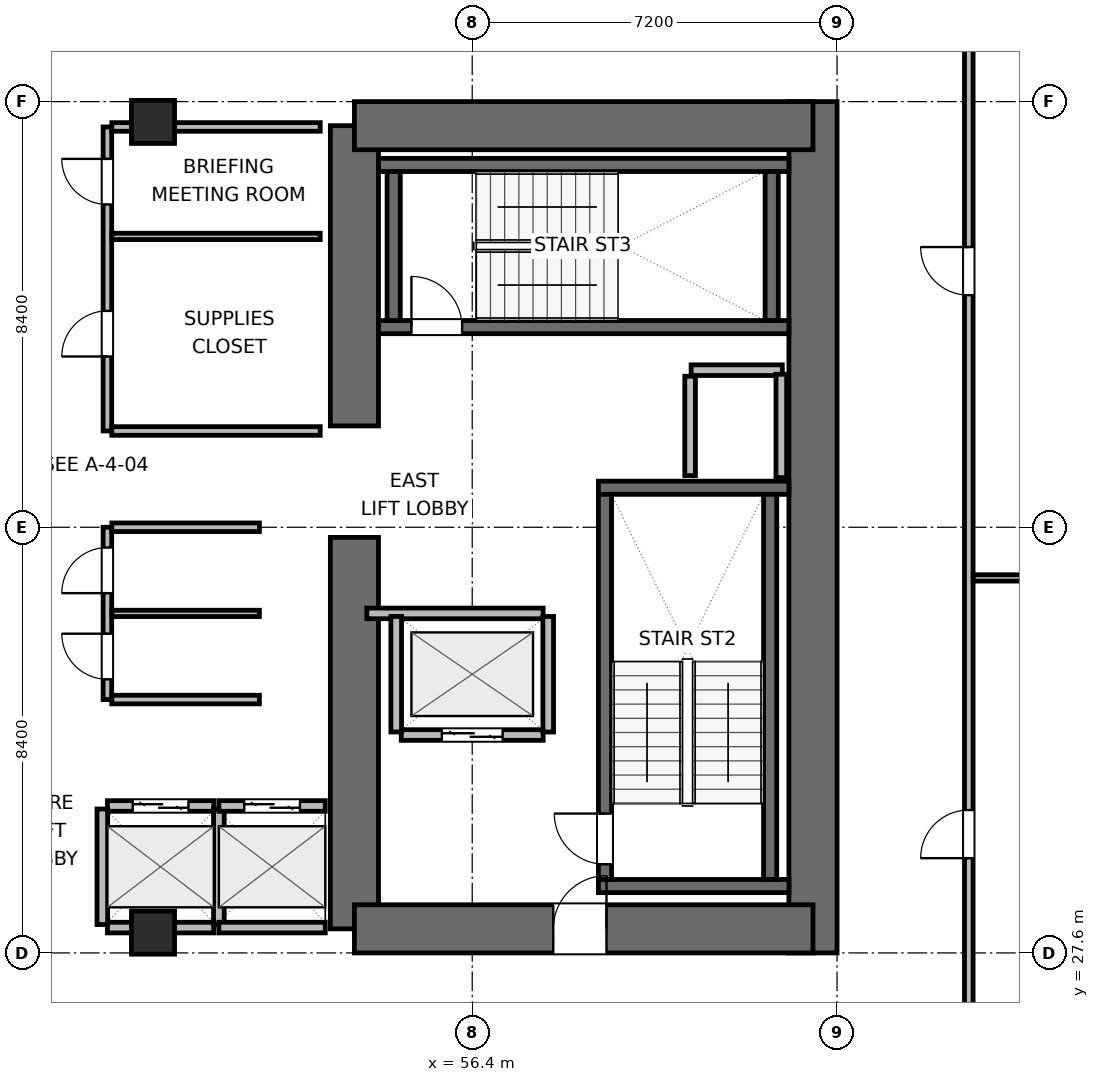
"""IFC4 building model, lengths in metres.
Left out: names, types, materials, properties, quantities, classifications, styles, units other than length and angle.
Written with IfcOpenShell. Run it as: python <this file> out.ifc"""

import sys

from ifc_helpers import new_model, si_unit, direction, frame, frame_2d, origin, origin_2d, place, context, subcontext, project, spatial, rectangle, extrude, element, fill, save


model = new_model("IFC4")
c1 = context("Model", 3, precision=1e-05, world=origin(), true_north=direction((0.0, 1.0)))
c2 = subcontext(c1, "Body", "Model", "MODEL_VIEW")
j1 = project(units=[si_unit("LENGTHUNIT", "METRE"), si_unit("PLANEANGLEUNIT", "RADIAN")], contexts=[c1])
p1 = place(None, origin())
s1 = spatial("IfcSite", under=j1, at=p1, CompositionType="ELEMENT")
p2 = place(p1, origin())
s2 = spatial("IfcBuilding", under=s1, at=p2, CompositionType="ELEMENT")
p3 = place(p2, frame((0.0, 0.0, 45.0)))
s3 = spatial("IfcBuildingStorey", under=s2, at=p3, CompositionType="ELEMENT", Elevation=45.0)
p4 = place(p3, frame((54.075, 28.075, 0.0), z_axis=(0.0, 0.0, 1.0), x_axis=(0.0, 1.0, 0.0)))
e1 = element("IfcWall", 1, at=p4, inside=s3, PredefinedType="SHEAR", context=c2, shape_type="SweptSolid", body=[
    extrude(rectangle(XDim=7.725, YDim=0.95, at=frame_2d((3.863, 0.0))), origin(), (0.0, 0.0, 1.0), 3.9),
])
p5 = place(p3, frame((54.075, 38.0, 0.0), z_axis=(0.0, 0.0, 1.0), x_axis=(0.0, 1.0, 0.0)))
e2 = element("IfcWall", 2, at=p5, inside=s3, PredefinedType="SHEAR", context=c2, shape_type="SweptSolid", body=[
    extrude(rectangle(XDim=5.925, YDim=0.95, at=frame_2d((2.962, 0.0))), origin(), (0.0, 0.0, 1.0), 3.9),
])
p6 = place(p3, frame((63.125, 27.6, 0.0), z_axis=(0.0, 0.0, 1.0), x_axis=(0.0, 1.0, 0.0)))
e3 = element("IfcWall", 3, at=p6, inside=s3, PredefinedType="SHEAR", context=c2, shape_type="SweptSolid", body=[
    extrude(rectangle(XDim=16.8, YDim=0.95, at=frame_2d((8.4, 0.0))), origin(), (0.0, 0.0, 1.0), 3.9),
])
p7 = place(p3, frame((54.075, 28.075, 0.0), z_axis=(0.0, 0.0, 1.0), x_axis=(1.0, 0.0, 0.0)))
e4 = element("IfcWall", 4, at=p7, inside=s3, PredefinedType="SHEAR", context=c2, shape_type="SweptSolid", body=[
    extrude(rectangle(XDim=9.05, YDim=0.95, at=frame_2d((4.525, 0.0))), origin(), (0.0, 0.0, 1.0), 3.9),
])
p8 = place(p7, frame((3.925, 0.0, 0.0)))
e5 = element("IfcOpeningElement", 5, at=p8, cuts=e4, PredefinedType="OPENING", context=c2, shape_type="SweptSolid", body=[
    extrude(rectangle(XDim=1.05, YDim=2.04, at=frame_2d((0.525, 1.02))), frame((0.0, 0.485, 0.0), z_axis=(0.0, -1.0, 0.0), x_axis=(1.0, 0.0, 0.0)), (0.0, 0.0, 1.0), 0.97),
])
p9 = place(p3, frame((54.075, 43.925, 0.0), z_axis=(0.0, 0.0, 1.0), x_axis=(1.0, 0.0, 0.0)))
e6 = element("IfcWall", 6, at=p9, inside=s3, PredefinedType="SHEAR", context=c2, shape_type="SweptSolid", body=[
    extrude(rectangle(XDim=9.05, YDim=0.95, at=frame_2d((4.525, 0.0))), origin(), (0.0, 0.0, 1.0), 3.9),
])
for number, where, z_axis, x_axis in (
    (7, (58.89, 28.92, 0.0), (0.0, 0.0, 1.0), (1.0, 0.0, 0.0)),
    (8, (58.89, 36.78, 0.0), (0.0, 0.0, 1.0), (1.0, 0.0, 0.0)),
):
    element("IfcWall", number, at=place(p3, frame(where, z_axis=z_axis, x_axis=x_axis)), inside=s3, PredefinedType="SHEAR", context=c2, shape_type="SweptSolid", body=[
        extrude(rectangle(XDim=3.76, YDim=0.26, at=frame_2d((1.88, 0.0))), origin(), (0.0, 0.0, 1.0), 3.9),
    ])
p10 = place(p3, frame((59.02, 29.05, 0.0), z_axis=(0.0, 0.0, 1.0), x_axis=(0.0, 1.0, 0.0)))
e9 = element("IfcWall", 9, at=p10, inside=s3, PredefinedType="SHEAR", context=c2, shape_type="SweptSolid", body=[
    extrude(rectangle(XDim=7.6, YDim=0.26, at=frame_2d((3.8, 0.0))), origin(), (0.0, 0.0, 1.0), 3.9),
])
p11 = place(p10, frame((0.3, 0.0, 0.0)))
e10 = element("IfcOpeningElement", 10, at=p11, cuts=e9, PredefinedType="OPENING", context=c2, shape_type="SweptSolid", body=[
    extrude(rectangle(XDim=1.0, YDim=2.04, at=frame_2d((0.5, 1.02))), frame((0.0, 0.14, 0.0), z_axis=(0.0, -1.0, 0.0), x_axis=(1.0, 0.0, 0.0)), (0.0, 0.0, 1.0), 0.28),
])
p12 = place(p3, frame((62.28, 29.05, 0.0), z_axis=(0.0, 0.0, 1.0), x_axis=(0.0, 1.0, 0.0)))
e11 = element("IfcWall", 11, at=p12, inside=s3, PredefinedType="SHEAR", context=c2, shape_type="SweptSolid", body=[
    extrude(rectangle(XDim=7.6, YDim=0.26, at=frame_2d((3.8, 0.0))), origin(), (0.0, 0.0, 1.0), 3.9),
])
p13 = place(p3, frame((54.55, 39.95, 0.0), z_axis=(0.0, 0.0, 1.0), x_axis=(1.0, 0.0, 0.0)))
e12 = element("IfcWall", 12, at=p13, inside=s3, PredefinedType="SHEAR", context=c2, shape_type="SweptSolid", body=[
    extrude(rectangle(XDim=8.1, YDim=0.26, at=frame_2d((4.05, 0.0))), origin(), (0.0, 0.0, 1.0), 3.9),
])
p14 = place(p13, frame((0.65, 0.0, 0.0)))
e13 = element("IfcOpeningElement", 13, at=p14, cuts=e12, PredefinedType="OPENING", context=c2, shape_type="SweptSolid", body=[
    extrude(rectangle(XDim=1.0, YDim=2.04, at=frame_2d((0.5, 1.02))), frame((0.0, 0.14, 0.0), z_axis=(0.0, -1.0, 0.0), x_axis=(1.0, 0.0, 0.0)), (0.0, 0.0, 1.0), 0.28),
])
p15 = place(p3, frame((54.55, 43.15, 0.0), z_axis=(0.0, 0.0, 1.0), x_axis=(1.0, 0.0, 0.0)))
e14 = element("IfcWall", 14, at=p15, inside=s3, PredefinedType="SHEAR", context=c2, shape_type="SweptSolid", body=[
    extrude(rectangle(XDim=8.1, YDim=0.26, at=frame_2d((4.05, 0.0))), origin(), (0.0, 0.0, 1.0), 3.9),
])
for number, where, z_axis, x_axis in (
    (15, (54.85, 40.08, 0.0), (0.0, 0.0, 1.0), (0.0, 1.0, 0.0)),
    (16, (62.31, 40.08, 0.0), (0.0, 0.0, 1.0), (0.0, 1.0, 0.0)),
):
    element("IfcWall", number, at=place(p3, frame(where, z_axis=z_axis, x_axis=x_axis)), inside=s3, PredefinedType="SHEAR", context=c2, shape_type="SweptSolid", body=[
        extrude(rectangle(XDim=2.94, YDim=0.26, at=frame_2d((1.47, 0.0))), origin(), (0.0, 0.0, 1.0), 3.9),
    ])
for number, where, z_axis, x_axis in (
    (17, (50.1, 28.0, 0.0), (0.0, 0.0, 1.0), (1.0, 0.0, 0.0)),
    (18, (50.1, 44.0, 0.0), (0.0, 0.0, 1.0), (1.0, 0.0, 0.0)),
):
    element("IfcColumn", number, at=place(p3, frame(where, z_axis=z_axis, x_axis=x_axis)), inside=s3, PredefinedType="COLUMN", context=c2, shape_type="SweptSolid", body=[
        extrude(rectangle(XDim=0.85, YDim=0.85, at=origin_2d()), origin(), (0.0, 0.0, 1.0), 3.9),
    ])
p16 = place(p3, frame((60.72, 39.1, 0.0), z_axis=(0.0, 0.0, 1.0), x_axis=(1.0, 0.0, 0.0)))
e19 = element("IfcWall", 19, at=p16, inside=s3, PredefinedType="PARTITIONING", context=c2, shape_type="SweptSolid", body=[
    extrude(rectangle(XDim=1.8, YDim=0.21, at=frame_2d((0.9, 0.0))), origin(), (0.0, 0.0, 1.0), 3.64),
])
p17 = place(p3, frame((60.7, 37.02, 0.0), z_axis=(0.0, 0.0, 1.0), x_axis=(0.0, 1.0, 0.0)))
e20 = element("IfcWall", 20, at=p17, inside=s3, PredefinedType="PARTITIONING", context=c2, shape_type="SweptSolid", body=[
    extrude(rectangle(XDim=1.96, YDim=0.21, at=frame_2d((0.98, 0.0))), origin(), (0.0, 0.0, 1.0), 3.64),
])
p18 = place(p3, frame((62.5, 36.98, 0.0), z_axis=(0.0, 0.0, 1.0), x_axis=(0.0, 1.0, 0.0)))
e21 = element("IfcWall", 21, at=p18, inside=s3, PredefinedType="PARTITIONING", context=c2, shape_type="SweptSolid", body=[
    extrude(rectangle(XDim=2.04, YDim=0.21, at=frame_2d((1.02, 0.0))), origin(), (0.0, 0.0, 1.0), 3.64),
])
p19 = place(p3, frame((55.0, 31.9, 0.0), z_axis=(0.0, 0.0, 1.0), x_axis=(1.0, 0.0, 0.0)))
e22 = element("IfcWall", 22, at=p19, inside=s3, PredefinedType="PARTITIONING", context=c2, shape_type="SweptSolid", body=[
    extrude(rectangle(XDim=2.8, YDim=0.21, at=frame_2d((1.4, 0.0))), origin(), (0.0, 0.0, 1.0), 3.64),
])
p20 = place(p19, frame((0.8, 0.0, 0.0)))
e23 = element("IfcOpeningElement", 23, at=p20, cuts=e22, PredefinedType="OPENING", context=c2, shape_type="SweptSolid", body=[
    extrude(rectangle(XDim=1.2, YDim=2.04, at=frame_2d((0.6, 1.02))), frame((0.0, 0.115, 0.0), z_axis=(0.0, -1.0, 0.0), x_axis=(1.0, 0.0, 0.0)), (0.0, 0.0, 1.0), 0.23),
])
p21 = place(p3, frame((54.32, 34.3, 0.0), z_axis=(0.0, 0.0, 1.0), x_axis=(1.0, 0.0, 0.0)))
e24 = element("IfcWall", 24, at=p21, inside=s3, PredefinedType="PARTITIONING", context=c2, shape_type="SweptSolid", body=[
    extrude(rectangle(XDim=3.48, YDim=0.21, at=frame_2d((1.74, 0.0))), origin(), (0.0, 0.0, 1.0), 3.64),
])
for number, where, z_axis, x_axis in (
    (25, (54.9, 31.96, 0.0), (0.0, 0.0, 1.0), (0.0, 1.0, 0.0)),
    (26, (57.9, 31.96, 0.0), (0.0, 0.0, 1.0), (0.0, 1.0, 0.0)),
):
    element("IfcWall", number, at=place(p3, frame(where, z_axis=z_axis, x_axis=x_axis)), inside=s3, PredefinedType="PARTITIONING", context=c2, shape_type="SweptSolid", body=[
        extrude(rectangle(XDim=2.28, YDim=0.21, at=frame_2d((1.14, 0.0))), origin(), (0.0, 0.0, 1.0), 3.64),
    ])
p22 = place(p3, frame((49.2, 30.5, 0.0), z_axis=(0.0, 0.0, 1.0), x_axis=(1.0, 0.0, 0.0)))
e27 = element("IfcWall", 27, at=p22, inside=s3, PredefinedType="PARTITIONING", context=c2, shape_type="SweptSolid", body=[
    extrude(rectangle(XDim=2.1, YDim=0.21, at=frame_2d((1.05, 0.0))), origin(), (0.0, 0.0, 1.0), 3.64),
])
p23 = place(p22, frame((0.5, 0.0, 0.0)))
e28 = element("IfcOpeningElement", 28, at=p23, cuts=e27, PredefinedType="OPENING", context=c2, shape_type="SweptSolid", body=[
    extrude(rectangle(XDim=1.1, YDim=2.04, at=frame_2d((0.55, 1.02))), frame((0.0, 0.115, 0.0), z_axis=(0.0, -1.0, 0.0), x_axis=(1.0, 0.0, 0.0)), (0.0, 0.0, 1.0), 0.23),
])
p24 = place(p3, frame((49.2, 28.1, 0.0), z_axis=(0.0, 0.0, 1.0), x_axis=(1.0, 0.0, 0.0)))
e29 = element("IfcWall", 29, at=p24, inside=s3, PredefinedType="PARTITIONING", context=c2, shape_type="SweptSolid", body=[
    extrude(rectangle(XDim=2.1, YDim=0.21, at=frame_2d((1.05, 0.0))), origin(), (0.0, 0.0, 1.0), 2.525),
])
for number, where, z_axis, x_axis in (
    (30, (49.1, 28.16, 0.0), (0.0, 0.0, 1.0), (0.0, 1.0, 0.0)),
    (31, (51.4, 28.16, 0.0), (0.0, 0.0, 1.0), (0.0, 1.0, 0.0)),
):
    element("IfcWall", number, at=place(p3, frame(where, z_axis=z_axis, x_axis=x_axis)), inside=s3, PredefinedType="PARTITIONING", context=c2, shape_type="SweptSolid", body=[
        extrude(rectangle(XDim=2.28, YDim=0.21, at=frame_2d((1.14, 0.0))), origin(), (0.0, 0.0, 1.0), 3.64),
    ])
p25 = place(p3, frame((51.4, 30.5, 0.0), z_axis=(0.0, 0.0, 1.0), x_axis=(1.0, 0.0, 0.0)))
e32 = element("IfcWall", 32, at=p25, inside=s3, PredefinedType="PARTITIONING", context=c2, shape_type="SweptSolid", body=[
    extrude(rectangle(XDim=2.1, YDim=0.21, at=frame_2d((1.05, 0.0))), origin(), (0.0, 0.0, 1.0), 3.64),
])
p26 = place(p25, frame((0.5, 0.0, 0.0)))
e33 = element("IfcOpeningElement", 33, at=p26, cuts=e32, PredefinedType="OPENING", context=c2, shape_type="SweptSolid", body=[
    extrude(rectangle(XDim=1.1, YDim=2.04, at=frame_2d((0.55, 1.02))), frame((0.0, 0.115, 0.0), z_axis=(0.0, -1.0, 0.0), x_axis=(1.0, 0.0, 0.0)), (0.0, 0.0, 1.0), 0.23),
])
p27 = place(p3, frame((51.4, 28.1, 0.0), z_axis=(0.0, 0.0, 1.0), x_axis=(1.0, 0.0, 0.0)))
e34 = element("IfcWall", 34, at=p27, inside=s3, PredefinedType="PARTITIONING", context=c2, shape_type="SweptSolid", body=[
    extrude(rectangle(XDim=2.1, YDim=0.21, at=frame_2d((1.05, 0.0))), origin(), (0.0, 0.0, 1.0), 2.525),
])
p28 = place(p3, frame((49.2, 32.6, 0.0), z_axis=(0.0, 0.0, 1.0), x_axis=(0.0, 1.0, 0.0)))
e35 = element("IfcWall", 35, at=p28, inside=s3, PredefinedType="PARTITIONING", context=c2, shape_type="SweptSolid", body=[
    extrude(rectangle(XDim=3.4, YDim=0.17, at=frame_2d((1.7, 0.0))), origin(), (0.0, 0.0, 1.0), 3.64),
])
p29 = place(p28, frame((0.4, 0.0, 0.0)))
e36 = element("IfcOpeningElement", 36, at=p29, cuts=e35, PredefinedType="OPENING", context=c2, shape_type="SweptSolid", body=[
    extrude(rectangle(XDim=0.9, YDim=2.02, at=frame_2d((0.45, 1.01))), frame((0.0, 0.095, 0.0), z_axis=(0.0, -1.0, 0.0), x_axis=(1.0, 0.0, 0.0)), (0.0, 0.0, 1.0), 0.19),
])
p30 = place(p28, frame((2.1, 0.0, 0.0)))
e37 = element("IfcOpeningElement", 37, at=p30, cuts=e35, PredefinedType="OPENING", context=c2, shape_type="SweptSolid", body=[
    extrude(rectangle(XDim=0.9, YDim=2.02, at=frame_2d((0.45, 1.01))), frame((0.0, 0.095, 0.0), z_axis=(0.0, -1.0, 0.0), x_axis=(1.0, 0.0, 0.0)), (0.0, 0.0, 1.0), 0.19),
])
for number, where, z_axis, x_axis in (
    (38, (49.287, 32.6, 0.0), (0.0, 0.0, 1.0), (1.0, 0.0, 0.0)),
    (39, (49.287, 36.0, 0.0), (0.0, 0.0, 1.0), (1.0, 0.0, 0.0)),
):
    element("IfcWall", number, at=place(p3, frame(where, z_axis=z_axis, x_axis=x_axis)), inside=s3, PredefinedType="PARTITIONING", context=c2, shape_type="SweptSolid", body=[
        extrude(rectangle(XDim=2.913, YDim=0.17, at=frame_2d((1.457, 0.0))), origin(), (0.0, 0.0, 1.0), 3.64),
    ])
p31 = place(p3, frame((49.287, 34.3, 0.0), z_axis=(0.0, 0.0, 1.0), x_axis=(1.0, 0.0, 0.0)))
e40 = element("IfcWall", 40, at=p31, inside=s3, PredefinedType="PARTITIONING", context=c2, shape_type="SweptSolid", body=[
    extrude(rectangle(XDim=2.913, YDim=0.125, at=frame_2d((1.457, 0.0))), origin(), (0.0, 0.0, 1.0), 3.64),
])
p32 = place(p3, frame((49.2, 37.9, 0.0), z_axis=(0.0, 0.0, 1.0), x_axis=(0.0, 1.0, 0.0)))
e41 = element("IfcWall", 41, at=p32, inside=s3, PredefinedType="PARTITIONING", context=c2, shape_type="SweptSolid", body=[
    extrude(rectangle(XDim=6.0, YDim=0.17, at=frame_2d((3.0, 0.0))), origin(), (0.0, 0.0, 1.0), 3.64),
])
p33 = place(p32, frame((1.47, 0.0, 0.0)))
e42 = element("IfcOpeningElement", 42, at=p33, cuts=e41, PredefinedType="OPENING", context=c2, shape_type="SweptSolid", body=[
    extrude(rectangle(XDim=0.9, YDim=2.02, at=frame_2d((0.45, 1.01))), frame((0.0, 0.095, 0.0), z_axis=(0.0, -1.0, 0.0), x_axis=(1.0, 0.0, 0.0)), (0.0, 0.0, 1.0), 0.19),
])
p34 = place(p32, frame((4.47, 0.0, 0.0)))
e43 = element("IfcOpeningElement", 43, at=p34, cuts=e41, PredefinedType="OPENING", context=c2, shape_type="SweptSolid", body=[
    extrude(rectangle(XDim=0.9, YDim=2.02, at=frame_2d((0.45, 1.01))), frame((0.0, 0.095, 0.0), z_axis=(0.0, -1.0, 0.0), x_axis=(1.0, 0.0, 0.0)), (0.0, 0.0, 1.0), 0.19),
])
p35 = place(p3, frame((49.287, 37.9, 0.0), z_axis=(0.0, 0.0, 1.0), x_axis=(1.0, 0.0, 0.0)))
e44 = element("IfcWall", 44, at=p35, inside=s3, PredefinedType="PARTITIONING", context=c2, shape_type="SweptSolid", body=[
    extrude(rectangle(XDim=4.113, YDim=0.17, at=frame_2d((2.056, 0.0))), origin(), (0.0, 0.0, 1.0), 3.64),
])
p36 = place(p3, frame((49.287, 43.9, 0.0), z_axis=(0.0, 0.0, 1.0), x_axis=(1.0, 0.0, 0.0)))
e45 = element("IfcWall", 45, at=p36, inside=s3, PredefinedType="PARTITIONING", context=c2, shape_type="SweptSolid", body=[
    extrude(rectangle(XDim=4.113, YDim=0.17, at=frame_2d((2.056, 0.0))), origin(), (0.0, 0.0, 1.0), 2.525),
])
p37 = place(p3, frame((49.287, 41.74, 0.0), z_axis=(0.0, 0.0, 1.0), x_axis=(1.0, 0.0, 0.0)))
e46 = element("IfcWall", 46, at=p37, inside=s3, PredefinedType="PARTITIONING", context=c2, shape_type="SweptSolid", body=[
    extrude(rectangle(XDim=4.113, YDim=0.125, at=frame_2d((2.056, 0.0))), origin(), (0.0, 0.0, 1.0), 3.64),
])
p38 = place(p3, frame((66.2, 24.977, 0.0), z_axis=(0.0, 0.0, 1.0), x_axis=(0.0, 1.0, 0.0)))
e47 = element("IfcWall", 47, at=p38, inside=s3, PredefinedType="PARTITIONING", context=c2, shape_type="SweptSolid", body=[
    extrude(rectangle(XDim=22.046, YDim=0.17, at=frame_2d((11.023, 0.0))), origin(), (0.0, 0.0, 1.0), 3.64),
])
p39 = place(p38, frame((4.493, 0.0, 0.0)))
e48 = element("IfcOpeningElement", 48, at=p39, cuts=e47, PredefinedType="OPENING", context=c2, shape_type="SweptSolid", body=[
    extrude(rectangle(XDim=0.95, YDim=2.04, at=frame_2d((0.475, 1.02))), frame((0.0, 0.095, 0.0), z_axis=(0.0, -1.0, 0.0), x_axis=(1.0, 0.0, 0.0)), (0.0, 0.0, 1.0), 0.19),
])
p40 = place(p38, frame((15.603, 0.0, 0.0)))
e49 = element("IfcOpeningElement", 49, at=p40, cuts=e47, PredefinedType="OPENING", context=c2, shape_type="SweptSolid", body=[
    extrude(rectangle(XDim=0.95, YDim=2.04, at=frame_2d((0.475, 1.02))), frame((0.0, 0.095, 0.0), z_axis=(0.0, -1.0, 0.0), x_axis=(1.0, 0.0, 0.0)), (0.0, 0.0, 1.0), 0.19),
])
p41 = place(p3, frame((66.287, 35.0, 0.0), z_axis=(0.0, 0.0, 1.0), x_axis=(1.0, 0.0, 0.0)))
e50 = element("IfcWall", 50, at=p41, inside=s3, PredefinedType="PARTITIONING", context=c2, shape_type="SweptSolid", body=[
    extrude(rectangle(XDim=12.668, YDim=0.125, at=frame_2d((6.334, 0.0))), origin(), (0.0, 0.0, 1.0), 3.64),
])
p42 = place(p11, origin())
e51 = element("IfcDoor", 51, at=p42, inside=s3, OperationType="SINGLE_SWING_RIGHT", PredefinedType="DOOR", context=c2, shape_type="SweptSolid", body=[
    extrude(rectangle(XDim=1.0, YDim=2.04, at=frame_2d((0.5, 1.02))), frame((0.0, 0.025, 0.0), z_axis=(0.0, -1.0, 0.0), x_axis=(1.0, 0.0, 0.0)), (0.0, 0.0, 1.0), 0.05),
])
fill(e10, e51)
p43 = place(p14, origin())
e52 = element("IfcDoor", 52, at=p43, inside=s3, OperationType="SINGLE_SWING_LEFT", PredefinedType="DOOR", context=c2, shape_type="SweptSolid", body=[
    extrude(rectangle(XDim=1.0, YDim=2.04, at=frame_2d((0.5, 1.02))), frame((0.0, 0.025, 0.0), z_axis=(0.0, -1.0, 0.0), x_axis=(1.0, 0.0, 0.0)), (0.0, 0.0, 1.0), 0.05),
])
fill(e13, e52)
p44 = place(p20, origin())
e53 = element("IfcDoor", 53, at=p44, inside=s3, OperationType="DOUBLE_DOOR_SLIDING", PredefinedType="DOOR", context=c2, shape_type="SweptSolid", body=[
    extrude(rectangle(XDim=1.2, YDim=2.04, at=frame_2d((0.6, 1.02))), frame((0.0, 0.025, 0.0), z_axis=(0.0, -1.0, 0.0), x_axis=(1.0, 0.0, 0.0)), (0.0, 0.0, 1.0), 0.05),
])
fill(e23, e53)
p45 = place(p23, origin())
e54 = element("IfcDoor", 54, at=p45, inside=s3, OperationType="DOUBLE_DOOR_SLIDING", PredefinedType="DOOR", context=c2, shape_type="SweptSolid", body=[
    extrude(rectangle(XDim=1.1, YDim=2.04, at=frame_2d((0.55, 1.02))), frame((0.0, 0.025, 0.0), z_axis=(0.0, -1.0, 0.0), x_axis=(1.0, 0.0, 0.0)), (0.0, 0.0, 1.0), 0.05),
])
fill(e28, e54)
p46 = place(p26, origin())
e55 = element("IfcDoor", 55, at=p46, inside=s3, OperationType="DOUBLE_DOOR_SLIDING", PredefinedType="DOOR", context=c2, shape_type="SweptSolid", body=[
    extrude(rectangle(XDim=1.1, YDim=2.04, at=frame_2d((0.55, 1.02))), frame((0.0, 0.025, 0.0), z_axis=(0.0, -1.0, 0.0), x_axis=(1.0, 0.0, 0.0)), (0.0, 0.0, 1.0), 0.05),
])
fill(e33, e55)
p47 = place(p8, origin())
e56 = element("IfcDoor", 56, at=p47, inside=s3, OperationType="SINGLE_SWING_RIGHT", PredefinedType="DOOR", context=c2, shape_type="SweptSolid", body=[
    extrude(rectangle(XDim=1.05, YDim=2.04, at=frame_2d((0.525, 1.02))), frame((0.0, 0.025, 0.0), z_axis=(0.0, -1.0, 0.0), x_axis=(1.0, 0.0, 0.0)), (0.0, 0.0, 1.0), 0.05),
])
fill(e5, e56)
p48 = place(p29, origin())
e57 = element("IfcDoor", 57, at=p48, inside=s3, OperationType="SINGLE_SWING_RIGHT", PredefinedType="DOOR", context=c2, shape_type="SweptSolid", body=[
    extrude(rectangle(XDim=0.9, YDim=2.02, at=frame_2d((0.45, 1.01))), frame((0.0, 0.025, 0.0), z_axis=(0.0, -1.0, 0.0), x_axis=(1.0, 0.0, 0.0)), (0.0, 0.0, 1.0), 0.05),
])
fill(e36, e57)
p49 = place(p30, origin())
e58 = element("IfcDoor", 58, at=p49, inside=s3, OperationType="SINGLE_SWING_LEFT", PredefinedType="DOOR", context=c2, shape_type="SweptSolid", body=[
    extrude(rectangle(XDim=0.9, YDim=2.02, at=frame_2d((0.45, 1.01))), frame((0.0, 0.025, 0.0), z_axis=(0.0, -1.0, 0.0), x_axis=(1.0, 0.0, 0.0)), (0.0, 0.0, 1.0), 0.05),
])
fill(e37, e58)
p50 = place(p33, origin())
e59 = element("IfcDoor", 59, at=p50, inside=s3, OperationType="SINGLE_SWING_LEFT", PredefinedType="DOOR", context=c2, shape_type="SweptSolid", body=[
    extrude(rectangle(XDim=0.9, YDim=2.02, at=frame_2d((0.45, 1.01))), frame((0.0, 0.025, 0.0), z_axis=(0.0, -1.0, 0.0), x_axis=(1.0, 0.0, 0.0)), (0.0, 0.0, 1.0), 0.05),
])
fill(e42, e59)
p51 = place(p34, origin())
e60 = element("IfcDoor", 60, at=p51, inside=s3, OperationType="SINGLE_SWING_RIGHT", PredefinedType="DOOR", context=c2, shape_type="SweptSolid", body=[
    extrude(rectangle(XDim=0.9, YDim=2.02, at=frame_2d((0.45, 1.01))), frame((0.0, 0.025, 0.0), z_axis=(0.0, -1.0, 0.0), x_axis=(1.0, 0.0, 0.0)), (0.0, 0.0, 1.0), 0.05),
])
fill(e43, e60)
p52 = place(p39, origin())
e61 = element("IfcDoor", 61, at=p52, inside=s3, OperationType="SINGLE_SWING_LEFT", PredefinedType="DOOR", context=c2, shape_type="SweptSolid", body=[
    extrude(rectangle(XDim=0.95, YDim=2.04, at=frame_2d((0.475, 1.02))), frame((0.0, 0.025, 0.0), z_axis=(0.0, -1.0, 0.0), x_axis=(1.0, 0.0, 0.0)), (0.0, 0.0, 1.0), 0.05),
])
fill(e48, e61)
p53 = place(p40, origin())
e62 = element("IfcDoor", 62, at=p53, inside=s3, OperationType="SINGLE_SWING_RIGHT", PredefinedType="DOOR", context=c2, shape_type="SweptSolid", body=[
    extrude(rectangle(XDim=0.95, YDim=2.04, at=frame_2d((0.475, 1.02))), frame((0.0, 0.025, 0.0), z_axis=(0.0, -1.0, 0.0), x_axis=(1.0, 0.0, 0.0)), (0.0, 0.0, 1.0), 0.05),
])
fill(e49, e62)
save(model, sys.argv[1])
